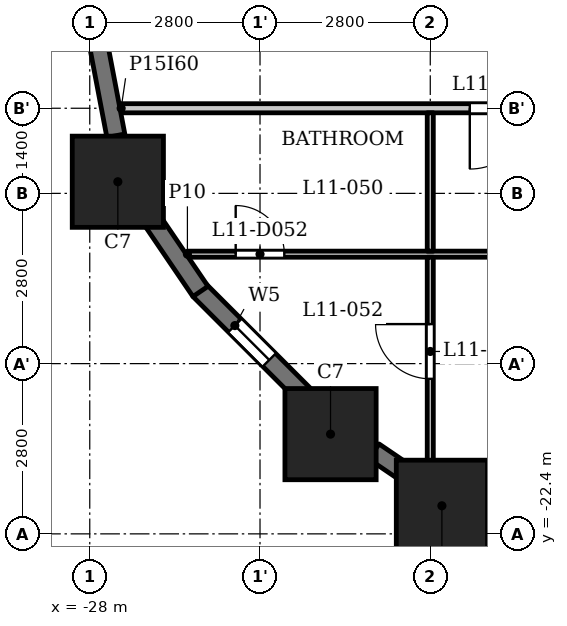
"""IFC4 building model, lengths in metres.
Left out: names, types, materials, properties, quantities, classifications, styles, units other than length and angle.
Written with IfcOpenShell. Run it as: python <this file> out.ifc"""

import sys

from ifc_helpers import new_model, si_unit, direction, frame, frame_2d, origin, origin_2d, place, context, subcontext, project, spatial, rectangle, extrude, element, fill, save


model = new_model("IFC4")
c1 = context("Model", 3, precision=1e-05, world=origin(), true_north=direction((0.0, 1.0)))
c2 = subcontext(c1, "Body", "Model", "MODEL_VIEW")
j1 = project(units=[si_unit("LENGTHUNIT", "METRE"), si_unit("PLANEANGLEUNIT", "RADIAN")], contexts=[c1])
p1 = place(None, origin())
s1 = spatial("IfcSite", under=j1, at=p1, CompositionType="ELEMENT")
p2 = place(p1, origin())
s2 = spatial("IfcBuilding", under=s1, at=p2, CompositionType="ELEMENT")
p3 = place(p2, frame((0.0, 0.0, 48.0)))
s3 = spatial("IfcBuildingStorey", under=s2, at=p3, CompositionType="ELEMENT", Elevation=48.0)
for number, where, z_axis, x_axis in (
    (1, (-22.209, -21.938, 0.0), (0.0, 0.0, 1.0), (1.0, 0.0, 0.0)),
    (2, (-27.538, -16.609, 0.0), (0.0, 0.0, 1.0), (1.0, 0.0, 0.0)),
    (3, (-24.04, -20.76, 0.0), (0.0, 0.0, 1.0), (1.0, 0.0, 0.0)),
):
    element("IfcColumn", number, at=place(p3, frame(where, z_axis=z_axis, x_axis=x_axis)), inside=s3, PredefinedType="COLUMN", context=c2, shape_type="SweptSolid", body=[
        extrude(rectangle(XDim=1.5, YDim=1.5, at=origin_2d()), origin(), (0.0, 0.0, 1.0), 3.5),
    ])
p4 = place(p3, frame((-26.197, -18.391, 0.0), z_axis=(0.0, 0.0, 1.0), x_axis=(0.707106781187, -0.707106781187, 0.0)))
e4 = element("IfcWall", 4, at=p4, inside=s3, PredefinedType="SOLIDWALL", context=c2, shape_type="SweptSolid", body=[
    extrude(rectangle(XDim=2.45, YDim=0.3, at=frame_2d((1.225, 0.0))), origin(), (0.0, 0.0, 1.0), 2.35),
])
p5 = place(p4, frame((0.825, 0.0, 0.6)))
e5 = element("IfcOpeningElement", 5, at=p5, cuts=e4, PredefinedType="OPENING", context=c2, shape_type="SweptSolid", body=[
    extrude(rectangle(XDim=0.8, YDim=1.55, at=frame_2d((0.4, 0.775))), frame((0.0, 0.16, 0.0), z_axis=(0.0, -1.0, 0.0), x_axis=(1.0, 0.0, 0.0)), (0.0, 0.0, 1.0), 0.32),
])
p6 = place(p3, frame((-23.327, -21.045, 0.0), z_axis=(0.0, 0.0, 1.0), x_axis=(0.827080706709, -0.562083182981, 0.0)))
e6 = element("IfcWall", 6, at=p6, inside=s3, PredefinedType="SOLIDWALL", context=c2, shape_type="SweptSolid", body=[
    extrude(rectangle(XDim=0.677, YDim=0.3, at=frame_2d((0.339, 0.0))), origin(), (0.0, 0.0, 1.0), 3.2),
])
for number, where, z_axis, x_axis in (
    (7, (-21.451, -21.97, 0.0), (0.0, 0.0, 1.0), (0.982, -0.187, 0.0)),
    (8, (-27.853, -14.372, 0.0), (0.0, 0.0, 1.0), (0.187, -0.982, 0.0)),
    (9, (-27.025, -17.167, 0.0), (0.0, 0.0, 1.0), (0.562, -0.827, 0.0)),
):
    element("IfcWall", number, at=place(p3, frame(where, z_axis=z_axis, x_axis=x_axis)), inside=s3, PredefinedType="SOLIDWALL", context=c2, shape_type="SweptSolid", body=[
        extrude(rectangle(XDim=1.506, YDim=0.3, at=frame_2d((0.753, 0.0))), origin(), (0.0, 0.0, 1.0), 2.35),
    ])
p7 = place(p3, frame((-26.394, -17.8, 0.0), z_axis=(0.0, 0.0, 1.0), x_axis=(1.0, 0.0, 0.0)))
e10 = element("IfcWall", 10, at=p7, inside=s3, PredefinedType="PARTITIONING", context=c2, shape_type="SweptSolid", body=[
    extrude(rectangle(XDim=53.126, YDim=0.1, at=frame_2d((26.563, 0.0))), origin(), (0.0, 0.0, 1.0), 3.2),
])
p8 = place(p7, frame((0.794, 0.0, 0.0)))
e11 = element("IfcOpeningElement", 11, at=p8, cuts=e10, PredefinedType="OPENING", context=c2, shape_type="SweptSolid", body=[
    extrude(rectangle(XDim=0.8, YDim=2.1, at=frame_2d((0.4, 1.05))), frame((0.0, 0.06, 0.0), z_axis=(0.0, -1.0, 0.0), x_axis=(1.0, 0.0, 0.0)), (0.0, 0.0, 1.0), 0.12),
])
p9 = place(p7, frame((5.644, 0.0, 0.0)))
e12 = element("IfcOpeningElement", 12, at=p9, cuts=e10, PredefinedType="OPENING", context=c2, shape_type="SweptSolid", body=[
    extrude(rectangle(XDim=0.9, YDim=2.1, at=frame_2d((0.45, 1.05))), frame((0.0, 0.06, 0.0), z_axis=(0.0, -1.0, 0.0), x_axis=(1.0, 0.0, 0.0)), (0.0, 0.0, 1.0), 0.12),
])
p10 = place(p7, frame((10.394, 0.0, 0.0)))
e13 = element("IfcOpeningElement", 13, at=p10, cuts=e10, PredefinedType="OPENING", context=c2, shape_type="SweptSolid", body=[
    extrude(rectangle(XDim=0.8, YDim=2.1, at=frame_2d((0.4, 1.05))), frame((0.0, 0.06, 0.0), z_axis=(0.0, -1.0, 0.0), x_axis=(1.0, 0.0, 0.0)), (0.0, 0.0, 1.0), 0.12),
])
p11 = place(p7, frame((13.244, 0.0, 0.0)))
e14 = element("IfcOpeningElement", 14, at=p11, cuts=e10, PredefinedType="OPENING", context=c2, shape_type="SweptSolid", body=[
    extrude(rectangle(XDim=0.9, YDim=2.1, at=frame_2d((0.45, 1.05))), frame((0.0, 0.06, 0.0), z_axis=(0.0, -1.0, 0.0), x_axis=(1.0, 0.0, 0.0)), (0.0, 0.0, 1.0), 0.12),
])
p12 = place(p7, frame((23.944, 0.0, 0.0)))
e15 = element("IfcOpeningElement", 15, at=p12, cuts=e10, PredefinedType="OPENING", context=c2, shape_type="SweptSolid", body=[
    extrude(rectangle(XDim=0.8, YDim=2.1, at=frame_2d((0.4, 1.05))), frame((0.0, 0.06, 0.0), z_axis=(0.0, -1.0, 0.0), x_axis=(1.0, 0.0, 0.0)), (0.0, 0.0, 1.0), 0.12),
])
p13 = place(p7, frame((22.194, 0.0, 0.0)))
e16 = element("IfcOpeningElement", 16, at=p13, cuts=e10, PredefinedType="OPENING", context=c2, shape_type="SweptSolid", body=[
    extrude(rectangle(XDim=0.9, YDim=2.1, at=frame_2d((0.45, 1.05))), frame((0.0, 0.06, 0.0), z_axis=(0.0, -1.0, 0.0), x_axis=(1.0, 0.0, 0.0)), (0.0, 0.0, 1.0), 0.12),
])
p14 = place(p7, frame((16.594, 0.0, 0.0)))
e17 = element("IfcOpeningElement", 17, at=p14, cuts=e10, PredefinedType="OPENING", context=c2, shape_type="SweptSolid", body=[
    extrude(rectangle(XDim=0.9, YDim=2.1, at=frame_2d((0.45, 1.05))), frame((0.0, 0.06, 0.0), z_axis=(0.0, -1.0, 0.0), x_axis=(1.0, 0.0, 0.0)), (0.0, 0.0, 1.0), 0.12),
])
p15 = place(p7, frame((18.844, 0.0, 0.0)))
e18 = element("IfcOpeningElement", 18, at=p15, cuts=e10, PredefinedType="OPENING", context=c2, shape_type="SweptSolid", body=[
    extrude(rectangle(XDim=0.9, YDim=2.1, at=frame_2d((0.45, 1.05))), frame((0.0, 0.06, 0.0), z_axis=(0.0, -1.0, 0.0), x_axis=(1.0, 0.0, 0.0)), (0.0, 0.0, 1.0), 0.12),
])
p16 = place(p7, frame((30.544, 0.0, 0.0)))
e19 = element("IfcOpeningElement", 19, at=p16, cuts=e10, PredefinedType="OPENING", context=c2, shape_type="SweptSolid", body=[
    extrude(rectangle(XDim=0.8, YDim=2.1, at=frame_2d((0.4, 1.05))), frame((0.0, 0.06, 0.0), z_axis=(0.0, -1.0, 0.0), x_axis=(1.0, 0.0, 0.0)), (0.0, 0.0, 1.0), 0.12),
])
p17 = place(p7, frame((27.294, 0.0, 0.0)))
e20 = element("IfcOpeningElement", 20, at=p17, cuts=e10, PredefinedType="OPENING", context=c2, shape_type="SweptSolid", body=[
    extrude(rectangle(XDim=0.9, YDim=2.1, at=frame_2d((0.45, 1.05))), frame((0.0, 0.06, 0.0), z_axis=(0.0, -1.0, 0.0), x_axis=(1.0, 0.0, 0.0)), (0.0, 0.0, 1.0), 0.12),
])
p18 = place(p7, frame((35.894, 0.0, 0.0)))
e21 = element("IfcOpeningElement", 21, at=p18, cuts=e10, PredefinedType="OPENING", context=c2, shape_type="SweptSolid", body=[
    extrude(rectangle(XDim=0.8, YDim=2.1, at=frame_2d((0.4, 1.05))), frame((0.0, 0.06, 0.0), z_axis=(0.0, -1.0, 0.0), x_axis=(1.0, 0.0, 0.0)), (0.0, 0.0, 1.0), 0.12),
])
p19 = place(p7, frame((33.644, 0.0, 0.0)))
e22 = element("IfcOpeningElement", 22, at=p19, cuts=e10, PredefinedType="OPENING", context=c2, shape_type="SweptSolid", body=[
    extrude(rectangle(XDim=0.9, YDim=2.1, at=frame_2d((0.45, 1.05))), frame((0.0, 0.06, 0.0), z_axis=(0.0, -1.0, 0.0), x_axis=(1.0, 0.0, 0.0)), (0.0, 0.0, 1.0), 0.12),
])
p20 = place(p7, frame((41.494, 0.0, 0.0)))
e23 = element("IfcOpeningElement", 23, at=p20, cuts=e10, PredefinedType="OPENING", context=c2, shape_type="SweptSolid", body=[
    extrude(rectangle(XDim=0.8, YDim=2.1, at=frame_2d((0.4, 1.05))), frame((0.0, 0.06, 0.0), z_axis=(0.0, -1.0, 0.0), x_axis=(1.0, 0.0, 0.0)), (0.0, 0.0, 1.0), 0.12),
])
p21 = place(p7, frame((38.744, 0.0, 0.0)))
e24 = element("IfcOpeningElement", 24, at=p21, cuts=e10, PredefinedType="OPENING", context=c2, shape_type="SweptSolid", body=[
    extrude(rectangle(XDim=0.9, YDim=2.1, at=frame_2d((0.45, 1.05))), frame((0.0, 0.06, 0.0), z_axis=(0.0, -1.0, 0.0), x_axis=(1.0, 0.0, 0.0)), (0.0, 0.0, 1.0), 0.12),
])
p22 = place(p7, frame((49.362, 0.0, 0.0)))
e25 = element("IfcOpeningElement", 25, at=p22, cuts=e10, PredefinedType="OPENING", context=c2, shape_type="SweptSolid", body=[
    extrude(rectangle(XDim=0.8, YDim=2.1, at=frame_2d((0.4, 1.05))), frame((0.0, 0.06, 0.0), z_axis=(0.0, -1.0, 0.0), x_axis=(1.0, 0.0, 0.0)), (0.0, 0.0, 1.0), 0.12),
])
p23 = place(p7, frame((45.094, 0.0, 0.0)))
e26 = element("IfcOpeningElement", 26, at=p23, cuts=e10, PredefinedType="OPENING", context=c2, shape_type="SweptSolid", body=[
    extrude(rectangle(XDim=0.9, YDim=2.1, at=frame_2d((0.45, 1.05))), frame((0.0, 0.06, 0.0), z_axis=(0.0, -1.0, 0.0), x_axis=(1.0, 0.0, 0.0)), (0.0, 0.0, 1.0), 0.12),
])
p24 = place(p3, frame((-27.484, -15.4, 0.0), z_axis=(0.0, 0.0, 1.0), x_axis=(1.0, 0.0, 0.0)))
e27 = element("IfcWall", 27, at=p24, inside=s3, PredefinedType="PARTITIONING", context=c2, shape_type="SweptSolid", body=[
    extrude(rectangle(XDim=54.968, YDim=0.15, at=frame_2d((27.484, 0.0))), origin(), (0.0, 0.0, 1.0), 3.2),
])
p25 = place(p24, frame((5.734, 0.0, 0.0)))
e28 = element("IfcOpeningElement", 28, at=p25, cuts=e27, PredefinedType="OPENING", context=c2, shape_type="SweptSolid", body=[
    extrude(rectangle(XDim=1.0, YDim=2.1, at=frame_2d((0.5, 1.05))), frame((0.0, 0.085, 0.0), z_axis=(0.0, -1.0, 0.0), x_axis=(1.0, 0.0, 0.0)), (0.0, 0.0, 1.0), 0.17),
])
p26 = place(p24, frame((13.334, 0.0, 0.0)))
e29 = element("IfcOpeningElement", 29, at=p26, cuts=e27, PredefinedType="OPENING", context=c2, shape_type="SweptSolid", body=[
    extrude(rectangle(XDim=1.0, YDim=2.1, at=frame_2d((0.5, 1.05))), frame((0.0, 0.085, 0.0), z_axis=(0.0, -1.0, 0.0), x_axis=(1.0, 0.0, 0.0)), (0.0, 0.0, 1.0), 0.17),
])
p27 = place(p24, frame((20.184, 0.0, 0.0)))
e30 = element("IfcOpeningElement", 30, at=p27, cuts=e27, PredefinedType="OPENING", context=c2, shape_type="SweptSolid", body=[
    extrude(rectangle(XDim=1.0, YDim=2.1, at=frame_2d((0.5, 1.05))), frame((0.0, 0.085, 0.0), z_axis=(0.0, -1.0, 0.0), x_axis=(1.0, 0.0, 0.0)), (0.0, 0.0, 1.0), 0.17),
])
p28 = place(p24, frame((29.384, 0.0, 0.0)))
e31 = element("IfcOpeningElement", 31, at=p28, cuts=e27, PredefinedType="OPENING", context=c2, shape_type="SweptSolid", body=[
    extrude(rectangle(XDim=1.0, YDim=2.1, at=frame_2d((0.5, 1.05))), frame((0.0, 0.085, 0.0), z_axis=(0.0, -1.0, 0.0), x_axis=(1.0, 0.0, 0.0)), (0.0, 0.0, 1.0), 0.17),
])
p29 = place(p24, frame((33.734, 0.0, 0.0)))
e32 = element("IfcOpeningElement", 32, at=p29, cuts=e27, PredefinedType="OPENING", context=c2, shape_type="SweptSolid", body=[
    extrude(rectangle(XDim=1.0, YDim=2.1, at=frame_2d((0.5, 1.05))), frame((0.0, 0.085, 0.0), z_axis=(0.0, -1.0, 0.0), x_axis=(1.0, 0.0, 0.0)), (0.0, 0.0, 1.0), 0.17),
])
p30 = place(p24, frame((39.584, 0.0, 0.0)))
e33 = element("IfcOpeningElement", 33, at=p30, cuts=e27, PredefinedType="OPENING", context=c2, shape_type="SweptSolid", body=[
    extrude(rectangle(XDim=1.0, YDim=2.1, at=frame_2d((0.5, 1.05))), frame((0.0, 0.085, 0.0), z_axis=(0.0, -1.0, 0.0), x_axis=(1.0, 0.0, 0.0)), (0.0, 0.0, 1.0), 0.17),
])
p31 = place(p24, frame((45.184, 0.0, 0.0)))
e34 = element("IfcOpeningElement", 34, at=p31, cuts=e27, PredefinedType="OPENING", context=c2, shape_type="SweptSolid", body=[
    extrude(rectangle(XDim=1.0, YDim=2.1, at=frame_2d((0.5, 1.05))), frame((0.0, 0.085, 0.0), z_axis=(0.0, -1.0, 0.0), x_axis=(1.0, 0.0, 0.0)), (0.0, 0.0, 1.0), 0.17),
])
p32 = place(p3, frame((-22.4, -21.72, 0.0), z_axis=(0.0, 0.0, 1.0), x_axis=(0.0, 1.0, 0.0)))
e35 = element("IfcWall", 35, at=p32, inside=s3, PredefinedType="PARTITIONING", context=c2, shape_type="SweptSolid", body=[
    extrude(rectangle(XDim=3.87, YDim=0.1, at=frame_2d((1.935, 0.0))), origin(), (0.0, 0.0, 1.0), 3.2),
])
p33 = place(p32, frame((1.87, 0.0, 0.0)))
e36 = element("IfcOpeningElement", 36, at=p33, cuts=e35, PredefinedType="OPENING", context=c2, shape_type="SweptSolid", body=[
    extrude(rectangle(XDim=0.9, YDim=2.1, at=frame_2d((0.45, 1.05))), frame((0.0, 0.06, 0.0), z_axis=(0.0, -1.0, 0.0), x_axis=(1.0, 0.0, 0.0)), (0.0, 0.0, 1.0), 0.12),
])
p34 = place(p3, frame((-22.4, -17.75, 0.0), z_axis=(0.0, 0.0, 1.0), x_axis=(0.0, 1.0, 0.0)))
e37 = element("IfcWall", 37, at=p34, inside=s3, PredefinedType="PARTITIONING", context=c2, shape_type="SweptSolid", body=[
    extrude(rectangle(XDim=2.275, YDim=0.1, at=frame_2d((1.137, 0.0))), origin(), (0.0, 0.0, 1.0), 3.2),
])
p35 = place(p25, origin())
e38 = element("IfcDoor", 38, at=p35, inside=s3, OperationType="SINGLE_SWING_LEFT", PredefinedType="DOOR", context=c2, shape_type="SweptSolid", body=[
    extrude(rectangle(XDim=1.0, YDim=2.1, at=frame_2d((0.5, 1.05))), frame((0.0, 0.025, 0.0), z_axis=(0.0, -1.0, 0.0), x_axis=(1.0, 0.0, 0.0)), (0.0, 0.0, 1.0), 0.05),
])
fill(e28, e38)
p36 = place(p8, origin())
e39 = element("IfcDoor", 39, at=p36, inside=s3, OperationType="SINGLE_SWING_RIGHT", PredefinedType="DOOR", context=c2, shape_type="SweptSolid", body=[
    extrude(rectangle(XDim=0.8, YDim=2.1, at=frame_2d((0.4, 1.05))), frame((0.0, 0.025, 0.0), z_axis=(0.0, -1.0, 0.0), x_axis=(1.0, 0.0, 0.0)), (0.0, 0.0, 1.0), 0.05),
])
fill(e11, e39)
p37 = place(p33, origin())
e40 = element("IfcDoor", 40, at=p37, inside=s3, OperationType="SINGLE_SWING_LEFT", PredefinedType="DOOR", context=c2, shape_type="SweptSolid", body=[
    extrude(rectangle(XDim=0.9, YDim=2.1, at=frame_2d((0.45, 1.05))), frame((0.0, 0.025, 0.0), z_axis=(0.0, -1.0, 0.0), x_axis=(1.0, 0.0, 0.0)), (0.0, 0.0, 1.0), 0.05),
])
fill(e36, e40)
p38 = place(p5, origin())
e41 = element("IfcWindow", 41, at=p38, inside=s3, PartitioningType="SINGLE_PANEL", PredefinedType="WINDOW", context=c2, shape_type="SweptSolid", body=[
    extrude(rectangle(XDim=0.8, YDim=1.55, at=frame_2d((0.4, 0.775))), frame((0.0, 0.03, 0.0), z_axis=(0.0, -1.0, 0.0), x_axis=(1.0, 0.0, 0.0)), (0.0, 0.0, 1.0), 0.06),
])
fill(e5, e41)
save(model, sys.argv[1])
